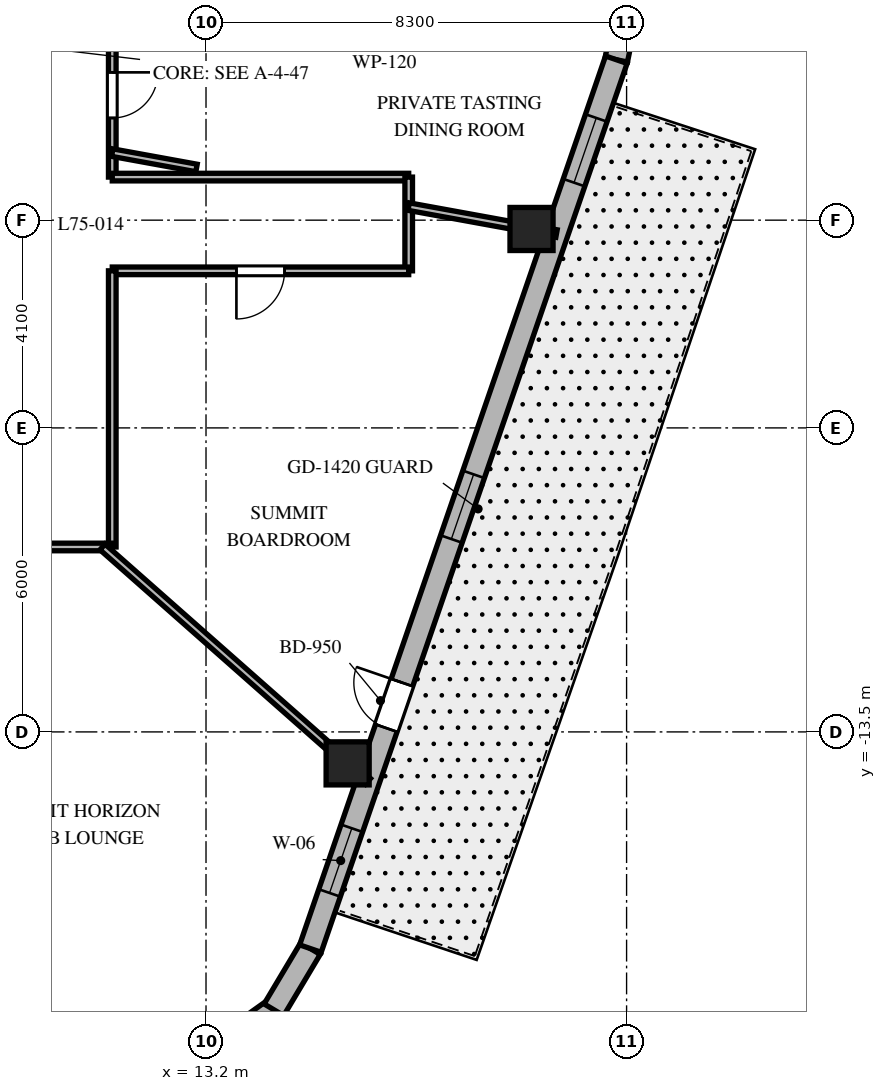
"""IFC4 building model, lengths in metres.
Left out: names, types, materials, properties, quantities, classifications, styles, units other than length and angle.
Written with IfcOpenShell. Run it as: python <this file> out.ifc"""

import sys

from ifc_helpers import new_model, si_unit, direction, frame, frame_2d, origin, origin_2d, place, context, subcontext, project, spatial, rectangle, extrude, element, fill, save


model = new_model("IFC4")
c1 = context("Model", 3, precision=1e-05, world=origin(), true_north=direction((0.0, 1.0)))
c2 = subcontext(c1, "Body", "Model", "MODEL_VIEW")
j1 = project(units=[si_unit("LENGTHUNIT", "METRE"), si_unit("PLANEANGLEUNIT", "RADIAN")], contexts=[c1])
p1 = place(None, origin())
s1 = spatial("IfcSite", under=j1, at=p1, CompositionType="ELEMENT")
p2 = place(p1, origin())
s2 = spatial("IfcBuilding", under=s1, at=p2, CompositionType="ELEMENT")
p3 = place(p2, frame((0.0, 0.0, 301.5)))
s3 = spatial("IfcBuildingStorey", under=s2, at=p3, CompositionType="ELEMENT", Elevation=301.5)
for number, where, z_axis, x_axis in (
    (1, (15.995, -14.121, 0.0), (0.0, 0.0, 1.0), (1.0, 0.0, 0.0)),
    (2, (19.624, -3.574, 0.0), (0.0, 0.0, 1.0), (1.0, 0.0, 0.0)),
):
    element("IfcColumn", number, at=place(p3, frame(where, z_axis=z_axis, x_axis=x_axis)), inside=s3, PredefinedType="COLUMN", context=c2, shape_type="SweptSolid", body=[
        extrude(rectangle(XDim=0.85, YDim=0.85, at=origin_2d()), origin(), (0.0, 0.0, 1.0), 3.9),
    ])
p4 = place(p3, frame((13.415, -19.787, 0.0), z_axis=(0.0, 0.0, 1.0), x_axis=(0.814055493997, 0.580787097561, 0.0)))
e3 = element("IfcWall", 3, at=p4, inside=s3, PredefinedType="SOLIDWALL", context=c2, shape_type="SweptSolid", body=[
    extrude(rectangle(XDim=1.383, YDim=0.45, at=frame_2d((0.691, 0.0))), origin(), (0.0, 0.0, 1.0), 3.58),
])
p5 = place(p3, frame((14.54, -18.984, 0.0), z_axis=(0.0, 0.0, 1.0), x_axis=(0.512374906623, 0.858761873317, 0.0)))
e4 = element("IfcWall", 4, at=p5, inside=s3, PredefinedType="SOLIDWALL", context=c2, shape_type="SweptSolid", body=[
    extrude(rectangle(XDim=1.406, YDim=0.45, at=frame_2d((0.703, 0.0))), origin(), (0.0, 0.0, 1.0), 3.58),
])
p6 = place(p3, frame((21.298, -0.233, 0.0), z_axis=(0.0, 0.0, 1.0), x_axis=(0.199158176661, 0.979967356941, 0.0)))
e5 = element("IfcWall", 5, at=p6, inside=s3, PredefinedType="SOLIDWALL", context=c2, shape_type="SweptSolid", body=[
    extrude(rectangle(XDim=0.895, YDim=0.45, at=frame_2d((0.447, 0.0))), origin(), (0.0, 0.0, 1.0), 3.58),
])
p7 = place(p3, frame((15.26, -17.776, 0.0), z_axis=(0.0, 0.0, 1.0), x_axis=(0.325407437101, 0.945573899745, 0.0)))
e6 = element("IfcWall", 6, at=p7, inside=s3, PredefinedType="SOLIDWALL", context=c2, shape_type="SweptSolid", body=[
    extrude(rectangle(XDim=18.552, YDim=0.45, at=frame_2d((9.276, 0.0))), origin(), (0.0, 0.0, 1.0), 3.58),
])
p8 = place(p7, frame((4.602, 0.0, 0.0)))
e7 = element("IfcOpeningElement", 7, at=p8, cuts=e6, PredefinedType="OPENING", context=c2, shape_type="SweptSolid", body=[
    extrude(rectangle(XDim=0.95, YDim=2.15, at=frame_2d((0.475, 1.075))), frame((0.0, 0.235, 0.0), z_axis=(0.0, -1.0, 0.0), x_axis=(1.0, 0.0, 0.0)), (0.0, 0.0, 1.0), 0.47),
])
p9 = place(p7, frame((1.161, 0.0, 0.8)))
e8 = element("IfcOpeningElement", 8, at=p9, cuts=e6, PredefinedType="OPENING", context=c2, shape_type="SweptSolid", body=[
    extrude(rectangle(XDim=1.35, YDim=1.75, at=frame_2d((0.675, 0.875))), frame((0.0, 0.235, 0.0), z_axis=(0.0, -1.0, 0.0), x_axis=(1.0, 0.0, 0.0)), (0.0, 0.0, 1.0), 0.47),
])
p10 = place(p7, frame((8.548, 0.0, 0.8)))
e9 = element("IfcOpeningElement", 9, at=p10, cuts=e6, PredefinedType="OPENING", context=c2, shape_type="SweptSolid", body=[
    extrude(rectangle(XDim=1.35, YDim=1.75, at=frame_2d((0.675, 0.875))), frame((0.0, 0.235, 0.0), z_axis=(0.0, -1.0, 0.0), x_axis=(1.0, 0.0, 0.0)), (0.0, 0.0, 1.0), 0.47),
])
p11 = place(p7, frame((15.987, 0.0, 0.8)))
e10 = element("IfcOpeningElement", 10, at=p11, cuts=e6, PredefinedType="OPENING", context=c2, shape_type="SweptSolid", body=[
    extrude(rectangle(XDim=1.35, YDim=1.75, at=frame_2d((0.675, 0.875))), frame((0.0, 0.235, 0.0), z_axis=(0.0, -1.0, 0.0), x_axis=(1.0, 0.0, 0.0)), (0.0, 0.0, 1.0), 0.47),
])
p12 = place(p3, frame((11.35, 9.85, 0.0), z_axis=(0.0, 0.0, 1.0), x_axis=(0.0, -1.0, 0.0)))
e11 = element("IfcWall", 11, at=p12, inside=s3, PredefinedType="PARTITIONING", context=c2, shape_type="SweptSolid", body=[
    extrude(rectangle(XDim=12.4, YDim=0.15, at=frame_2d((6.2, 0.0))), origin(), (0.0, 0.0, 1.0), 2.17),
])
p13 = place(p12, frame((7.697, 0.0, 0.0)))
e12 = element("IfcOpeningElement", 12, at=p13, cuts=e11, PredefinedType="OPENING", context=c2, shape_type="SweptSolid", body=[
    extrude(rectangle(XDim=0.95, YDim=2.03, at=frame_2d((0.475, 1.015))), frame((0.0, 0.085, 0.0), z_axis=(0.0, -1.0, 0.0), x_axis=(1.0, 0.0, 0.0)), (0.0, 0.0, 1.0), 0.17),
])
p14 = place(p12, frame((2.998, 0.0, 0.0)))
e13 = element("IfcOpeningElement", 13, at=p14, cuts=e11, PredefinedType="OPENING", context=c2, shape_type="SweptSolid", body=[
    extrude(rectangle(XDim=0.95, YDim=2.03, at=frame_2d((0.475, 1.015))), frame((0.0, 0.085, 0.0), z_axis=(0.0, -1.0, 0.0), x_axis=(1.0, 0.0, 0.0)), (0.0, 0.0, 1.0), 0.17),
])
p15 = place(p12, frame((10.333, 0.0, 0.0)))
e14 = element("IfcOpeningElement", 14, at=p15, cuts=e11, PredefinedType="OPENING", context=c2, shape_type="SweptSolid", body=[
    extrude(rectangle(XDim=0.9, YDim=2.03, at=frame_2d((0.45, 1.015))), frame((0.0, 0.085, 0.0), z_axis=(0.0, -1.0, 0.0), x_axis=(1.0, 0.0, 0.0)), (0.0, 0.0, 1.0), 0.17),
])
p16 = place(p3, frame((11.35, -2.55, 0.0), z_axis=(0.0, 0.0, 1.0), x_axis=(1.0, 0.0, 0.0)))
e15 = element("IfcWall", 15, at=p16, inside=s3, PredefinedType="PARTITIONING", context=c2, shape_type="SweptSolid", body=[
    extrude(rectangle(XDim=5.85, YDim=0.15, at=frame_2d((2.925, 0.0))), origin(), (0.0, 0.0, 1.0), 2.17),
])
p17 = place(p3, frame((17.2, -2.55, 0.0), z_axis=(0.0, 0.0, 1.0), x_axis=(0.0, -1.0, 0.0)))
e16 = element("IfcWall", 16, at=p17, inside=s3, PredefinedType="PARTITIONING", context=c2, shape_type="SweptSolid", body=[
    extrude(rectangle(XDim=1.85, YDim=0.15, at=frame_2d((0.925, 0.0))), origin(), (0.0, 0.0, 1.0), 2.17),
])
p18 = place(p3, frame((17.2, -4.4, 0.0), z_axis=(0.0, 0.0, 1.0), x_axis=(-1.0, 0.0, 0.0)))
e17 = element("IfcWall", 17, at=p18, inside=s3, PredefinedType="PARTITIONING", context=c2, shape_type="SweptSolid", body=[
    extrude(rectangle(XDim=5.85, YDim=0.15, at=frame_2d((2.925, 0.0))), origin(), (0.0, 0.0, 1.0), 2.17),
])
p19 = place(p18, frame((2.45, 0.0, 0.0)))
e18 = element("IfcOpeningElement", 18, at=p19, cuts=e17, PredefinedType="OPENING", context=c2, shape_type="SweptSolid", body=[
    extrude(rectangle(XDim=0.95, YDim=2.03, at=frame_2d((0.475, 1.015))), frame((0.0, 0.085, 0.0), z_axis=(0.0, -1.0, 0.0), x_axis=(1.0, 0.0, 0.0)), (0.0, 0.0, 1.0), 0.17),
])
p20 = place(p3, frame((11.35, -4.4, 0.0), z_axis=(0.0, 0.0, 1.0), x_axis=(0.0, -1.0, 0.0)))
e19 = element("IfcWall", 19, at=p20, inside=s3, PredefinedType="PARTITIONING", context=c2, shape_type="SweptSolid", body=[
    extrude(rectangle(XDim=5.45, YDim=0.15, at=frame_2d((2.725, 0.0))), origin(), (0.0, 0.0, 1.0), 2.17),
])
p21 = place(p3, frame((11.35, -9.85, 0.0), z_axis=(0.0, 0.0, 1.0), x_axis=(-1.0, 0.0, 0.0)))
e20 = element("IfcWall", 20, at=p21, inside=s3, PredefinedType="PARTITIONING", context=c2, shape_type="SweptSolid", body=[
    extrude(rectangle(XDim=10.43, YDim=0.15, at=frame_2d((5.215, 0.0))), origin(), (0.0, 0.0, 1.0), 2.17),
])
p22 = place(p21, frame((8.407, 0.0, 0.0)))
e21 = element("IfcOpeningElement", 21, at=p22, cuts=e20, PredefinedType="OPENING", context=c2, shape_type="SweptSolid", body=[
    extrude(rectangle(XDim=0.9, YDim=2.03, at=frame_2d((0.45, 1.015))), frame((0.0, 0.085, 0.0), z_axis=(0.0, -1.0, 0.0), x_axis=(1.0, 0.0, 0.0)), (0.0, 0.0, 1.0), 0.17),
])
p23 = place(p21, frame((3.416, 0.0, 0.0)))
e22 = element("IfcOpeningElement", 22, at=p23, cuts=e20, PredefinedType="OPENING", context=c2, shape_type="SweptSolid", body=[
    extrude(rectangle(XDim=0.95, YDim=2.03, at=frame_2d((0.475, 1.015))), frame((0.0, 0.085, 0.0), z_axis=(0.0, -1.0, 0.0), x_axis=(1.0, 0.0, 0.0)), (0.0, 0.0, 1.0), 0.17),
])
p24 = place(p3, frame((11.157, -9.85, 0.0), z_axis=(0.0, 0.0, 1.0), x_axis=(0.74966962095, -0.661812253909, 0.0)))
e23 = element("IfcWall", 23, at=p24, inside=s3, PredefinedType="PARTITIONING", context=c2, shape_type="SweptSolid", body=[
    extrude(rectangle(XDim=6.989, YDim=0.15, at=frame_2d((3.494, 0.0))), origin(), (0.0, 0.0, 1.0), 2.17),
])
p25 = place(p3, frame((11.35, -2.067, 0.0), z_axis=(0.0, 0.0, 1.0), x_axis=(0.983807459651, -0.179228575665, 0.0)))
e24 = element("IfcWall", 24, at=p25, inside=s3, PredefinedType="PARTITIONING", context=c2, shape_type="SweptSolid", body=[
    extrude(rectangle(XDim=1.69, YDim=0.15, at=frame_2d((0.845, 0.0))), origin(), (0.0, 0.0, 1.0), 3.58),
])
p26 = place(p3, frame((17.2, -3.133, 0.0), z_axis=(0.0, 0.0, 1.0), x_axis=(0.983817168797, -0.179175272791, 0.0)))
e25 = element("IfcWall", 25, at=p26, inside=s3, PredefinedType="PARTITIONING", context=c2, shape_type="SweptSolid", body=[
    extrude(rectangle(XDim=2.965, YDim=0.15, at=frame_2d((1.482, 0.0))), origin(), (0.0, 0.0, 1.0), 2.17),
])
p27 = place(p8, origin())
e26 = element("IfcDoor", 26, at=p27, inside=s3, OperationType="SINGLE_SWING_RIGHT", PredefinedType="DOOR", context=c2, shape_type="SweptSolid", body=[
    extrude(rectangle(XDim=0.95, YDim=2.15, at=frame_2d((0.475, 1.075))), frame((0.0, 0.025, 0.0), z_axis=(0.0, -1.0, 0.0), x_axis=(1.0, 0.0, 0.0)), (0.0, 0.0, 1.0), 0.05),
])
fill(e7, e26)
p28 = place(p9, origin())
e27 = element("IfcWindow", 27, at=p28, inside=s3, PartitioningType="SINGLE_PANEL", PredefinedType="WINDOW", context=c2, shape_type="SweptSolid", body=[
    extrude(rectangle(XDim=1.35, YDim=1.75, at=frame_2d((0.675, 0.875))), frame((0.0, 0.03, 0.0), z_axis=(0.0, -1.0, 0.0), x_axis=(1.0, 0.0, 0.0)), (0.0, 0.0, 1.0), 0.06),
])
fill(e8, e27)
p29 = place(p10, origin())
e28 = element("IfcWindow", 28, at=p29, inside=s3, PartitioningType="SINGLE_PANEL", PredefinedType="WINDOW", context=c2, shape_type="SweptSolid", body=[
    extrude(rectangle(XDim=1.35, YDim=1.75, at=frame_2d((0.675, 0.875))), frame((0.0, 0.03, 0.0), z_axis=(0.0, -1.0, 0.0), x_axis=(1.0, 0.0, 0.0)), (0.0, 0.0, 1.0), 0.06),
])
fill(e9, e28)
p30 = place(p11, origin())
e29 = element("IfcWindow", 29, at=p30, inside=s3, PartitioningType="SINGLE_PANEL", PredefinedType="WINDOW", context=c2, shape_type="SweptSolid", body=[
    extrude(rectangle(XDim=1.35, YDim=1.75, at=frame_2d((0.675, 0.875))), frame((0.0, 0.03, 0.0), z_axis=(0.0, -1.0, 0.0), x_axis=(1.0, 0.0, 0.0)), (0.0, 0.0, 1.0), 0.06),
])
fill(e10, e29)
p31 = place(p19, origin())
e30 = element("IfcDoor", 30, at=p31, inside=s3, OperationType="SINGLE_SWING_RIGHT", PredefinedType="DOOR", context=c2, shape_type="SweptSolid", body=[
    extrude(rectangle(XDim=0.95, YDim=2.03, at=frame_2d((0.475, 1.015))), frame((0.0, 0.025, 0.0), z_axis=(0.0, -1.0, 0.0), x_axis=(1.0, 0.0, 0.0)), (0.0, 0.0, 1.0), 0.05),
])
fill(e18, e30)
p32 = place(p15, origin())
e31 = element("IfcDoor", 31, at=p32, inside=s3, OperationType="SINGLE_SWING_LEFT", PredefinedType="DOOR", context=c2, shape_type="SweptSolid", body=[
    extrude(rectangle(XDim=0.9, YDim=2.03, at=frame_2d((0.45, 1.015))), frame((0.0, 0.025, 0.0), z_axis=(0.0, -1.0, 0.0), x_axis=(1.0, 0.0, 0.0)), (0.0, 0.0, 1.0), 0.05),
])
fill(e14, e31)
save(model, sys.argv[1])
